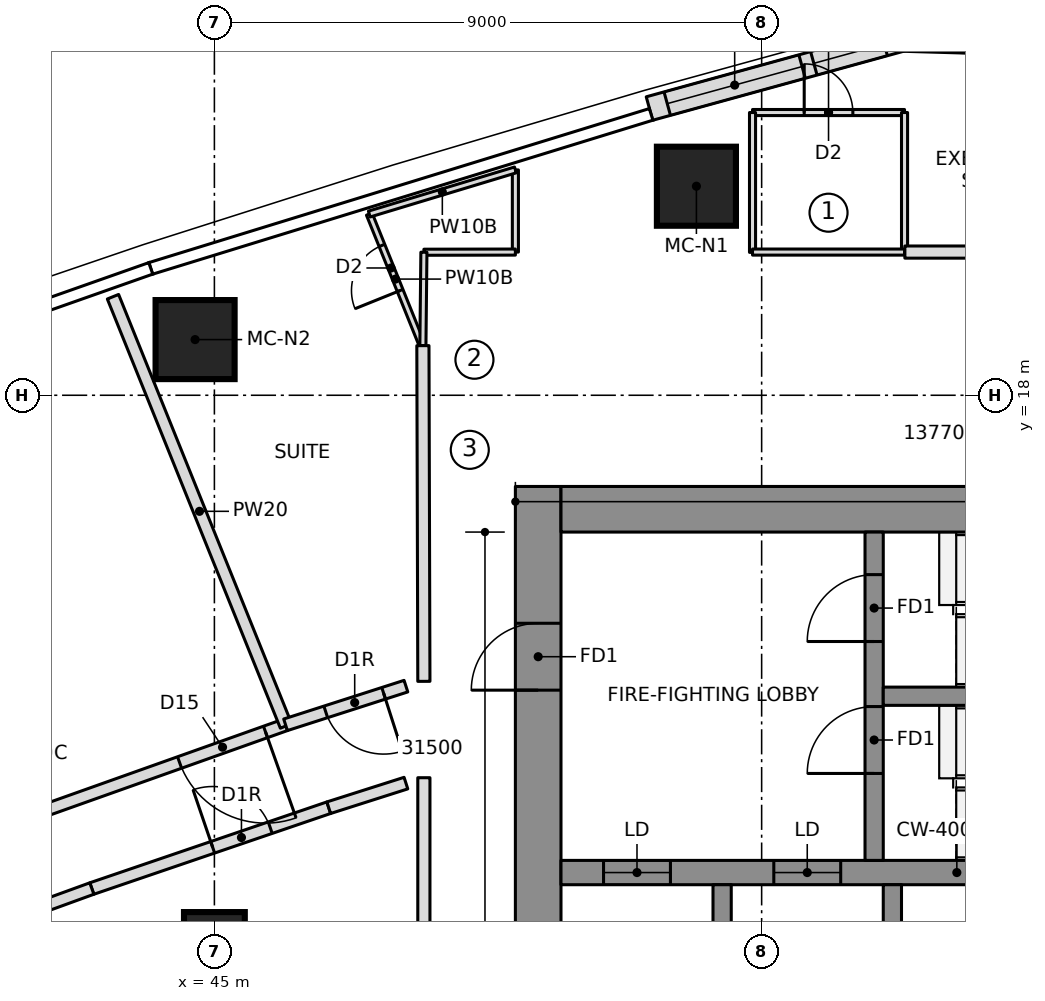
"""IFC4 building model, lengths in metres.
Left out: names, types, materials, properties, quantities, classifications, styles, units other than length and angle.
Written with IfcOpenShell. Run it as: python <this file> out.ifc"""

import sys

from ifc_helpers import new_model, si_unit, direction, frame, frame_2d, origin, origin_2d, place, context, subcontext, project, spatial, polyline, rectangle, outline, extrude, element, fill, save


model = new_model("IFC4")
c1 = context("Model", 3, precision=1e-05, world=origin(), true_north=direction((0.0, 1.0)))
c2 = subcontext(c1, "Body", "Model", "MODEL_VIEW")
j1 = project(units=[si_unit("LENGTHUNIT", "METRE"), si_unit("PLANEANGLEUNIT", "RADIAN")], contexts=[c1])
p1 = place(None, origin())
s1 = spatial("IfcSite", under=j1, at=p1, CompositionType="ELEMENT")
p2 = place(p1, origin())
s2 = spatial("IfcBuilding", under=s1, at=p2, CompositionType="ELEMENT")
p3 = place(p2, frame((0.0, 0.0, 196.8)))
s3 = spatial("IfcBuildingStorey", under=s2, at=p3, CompositionType="ELEMENT", Elevation=196.8)
p4 = place(p3, frame((50.325, 6.65, 0.0), z_axis=(0.0, 0.0, 1.0), x_axis=(0.0, 1.0, 0.0)))
e1 = element("IfcWall", 1, at=p4, inside=s3, PredefinedType="SHEAR", context=c2, shape_type="SweptSolid", body=[
    extrude(rectangle(XDim=9.85, YDim=0.75, at=frame_2d((4.925, 0.0))), origin(), (0.0, 0.0, 1.0), 3.55),
])
p5 = place(p4, frame((6.5, 0.0, 0.0)))
e2 = element("IfcOpeningElement", 2, at=p5, cuts=e1, PredefinedType="OPENING", context=c2, shape_type="SweptSolid", body=[
    extrude(rectangle(XDim=1.1, YDim=2.1, at=frame_2d((0.55, 1.05))), frame((0.0, 0.385, 0.0), z_axis=(0.0, -1.0, 0.0), x_axis=(1.0, 0.0, 0.0)), (0.0, 0.0, 1.0), 0.77),
])
p6 = place(p3, frame((50.7, 16.125, 0.0), z_axis=(0.0, 0.0, 1.0), x_axis=(1.0, 0.0, 0.0)))
e3 = element("IfcWall", 3, at=p6, inside=s3, PredefinedType="SHEAR", context=c2, shape_type="SweptSolid", body=[
    extrude(rectangle(XDim=13.77, YDim=0.75, at=frame_2d((6.885, 0.0))), origin(), (0.0, 0.0, 1.0), 3.55),
])
p7 = place(p3, frame((50.7, 10.15, 0.0), z_axis=(0.0, 0.0, 1.0), x_axis=(1.0, 0.0, 0.0)))
e4 = element("IfcWall", 4, at=p7, inside=s3, PredefinedType="SHEAR", context=c2, shape_type="SweptSolid", body=[
    extrude(rectangle(XDim=13.02, YDim=0.4, at=frame_2d((6.51, 0.0))), origin(), (0.0, 0.0, 1.0), 3.55),
])
p8 = place(p7, frame((0.7, 0.0, 0.0)))
e5 = element("IfcOpeningElement", 5, at=p8, cuts=e4, PredefinedType="OPENING", context=c2, shape_type="SweptSolid", body=[
    extrude(rectangle(XDim=1.1, YDim=2.1, at=frame_2d((0.55, 1.05))), frame((0.0, 0.21, 0.0), z_axis=(0.0, -1.0, 0.0), x_axis=(1.0, 0.0, 0.0)), (0.0, 0.0, 1.0), 0.42),
])
p9 = place(p7, frame((3.5, 0.0, 0.0)))
e6 = element("IfcOpeningElement", 6, at=p9, cuts=e4, PredefinedType="OPENING", context=c2, shape_type="SweptSolid", body=[
    extrude(rectangle(XDim=1.1, YDim=2.1, at=frame_2d((0.55, 1.05))), frame((0.0, 0.21, 0.0), z_axis=(0.0, -1.0, 0.0), x_axis=(1.0, 0.0, 0.0)), (0.0, 0.0, 1.0), 0.42),
])
for number, where, z_axis, x_axis in (
    (7, (53.35, 6.95, 0.0), (0.0, 0.0, 1.0), (0.0, 1.0, 0.0)),
    (8, (56.15, 6.95, 0.0), (0.0, 0.0, 1.0), (0.0, 1.0, 0.0)),
):
    element("IfcWall", number, at=place(p3, frame(where, z_axis=z_axis, x_axis=x_axis)), inside=s3, PredefinedType="SHEAR", context=c2, shape_type="SweptSolid", body=[
        extrude(rectangle(XDim=3.0, YDim=0.3, at=frame_2d((1.5, 0.0))), origin(), (0.0, 0.0, 1.0), 3.55),
    ])
p10 = place(p3, frame((55.85, 10.35, 0.0), z_axis=(0.0, 0.0, 1.0), x_axis=(0.0, 1.0, 0.0)))
e9 = element("IfcWall", 9, at=p10, inside=s3, PredefinedType="SHEAR", context=c2, shape_type="SweptSolid", body=[
    extrude(rectangle(XDim=5.4, YDim=0.3, at=frame_2d((2.7, 0.0))), origin(), (0.0, 0.0, 1.0), 3.55),
])
p11 = place(p10, frame((1.43, 0.0, 0.0)))
e10 = element("IfcOpeningElement", 10, at=p11, cuts=e9, PredefinedType="OPENING", context=c2, shape_type="SweptSolid", body=[
    extrude(rectangle(XDim=1.1, YDim=2.1, at=frame_2d((0.55, 1.05))), frame((0.0, 0.16, 0.0), z_axis=(0.0, -1.0, 0.0), x_axis=(1.0, 0.0, 0.0)), (0.0, 0.0, 1.0), 0.32),
])
p12 = place(p10, frame((3.6, 0.0, 0.0)))
e11 = element("IfcOpeningElement", 11, at=p12, cuts=e9, PredefinedType="OPENING", context=c2, shape_type="SweptSolid", body=[
    extrude(rectangle(XDim=1.1, YDim=2.1, at=frame_2d((0.55, 1.05))), frame((0.0, 0.16, 0.0), z_axis=(0.0, -1.0, 0.0), x_axis=(1.0, 0.0, 0.0)), (0.0, 0.0, 1.0), 0.32),
])
p13 = place(p3, frame((56.0, 13.05, 0.0), z_axis=(0.0, 0.0, 1.0), x_axis=(1.0, 0.0, 0.0)))
e12 = element("IfcWall", 12, at=p13, inside=s3, PredefinedType="SHEAR", context=c2, shape_type="SweptSolid", body=[
    extrude(rectangle(XDim=7.72, YDim=0.3, at=frame_2d((3.86, 0.0))), origin(), (0.0, 0.0, 1.0), 3.55),
])
for number, where, z_axis, x_axis in (
    (13, (52.927, 21.438, 0.0), (0.0, 0.0, 1.0), (1.0, 0.0, 0.0)),
    (14, (44.683, 18.916, 0.0), (0.0, 0.0, 1.0), (1.0, 0.0, 0.0)),
):
    element("IfcColumn", number, at=place(p3, frame(where, z_axis=z_axis, x_axis=x_axis)), inside=s3, PredefinedType="COLUMN", context=c2, shape_type="SweptSolid", body=[
        extrude(rectangle(XDim=1.3, YDim=1.3, at=origin_2d()), origin(), (0.0, 0.0, 1.0), 3.55),
    ])
p14 = place(p3, frame((45.0, 9.0, 0.0), z_axis=(0.0, 0.0, 1.0), x_axis=(1.0, 0.0, 0.0)))
e15 = element("IfcColumn", 15, at=p14, inside=s3, PredefinedType="COLUMN", context=c2, shape_type="SweptSolid", body=[
    extrude(rectangle(XDim=1.0, YDim=1.0, at=origin_2d()), origin(), (0.0, 0.0, 1.0), 3.55),
])
p15 = place(p3, frame((60.236, 23.745, 0.0), z_axis=(0.0, 0.0, 1.0), x_axis=(-0.999587920197, 0.028705222472, 0.0)))
e16 = element("IfcWall", 16, at=p15, inside=s3, PredefinedType="NOTDEFINED", context=c2, shape_type="SweptSolid", body=[
    extrude(outline(polyline([(-0.059, -0.2), (3.959, -0.2), (3.9, 0.2), (0.059, 0.2), (-0.059, -0.2)])), origin(), (0.0, 0.0, 1.0), 3.25),
])
p16 = place(p15, frame((0.865, 0.0, 0.6)))
e17 = element("IfcOpeningElement", 17, at=p16, cuts=e16, PredefinedType="OPENING", context=c2, shape_type="SweptSolid", body=[
    extrude(outline(polyline([(0.0, 1.35), (0.084, 1.771), (0.322, 2.128), (0.679, 2.366), (1.1, 2.45), (1.521, 2.366), (1.878, 2.128), (2.116, 1.771), (2.2, 1.35), (2.2, 1.1), (2.116, 0.679), (1.878, 0.322), (1.521, 0.084), (1.1, 0.0), (0.679, 0.084), (0.322, 0.322), (0.084, 0.679), (0.0, 1.1), (0.0, 1.35)])), frame((0.0, 0.21, 0.0), z_axis=(0.0, -1.0, 0.0), x_axis=(1.0, 0.0, 0.0)), (0.0, 0.0, 1.0), 0.42),
])
p17 = place(p3, frame((56.308, 23.858, 0.0), z_axis=(0.0, 0.0, 1.0), x_axis=(-0.964205755089, -0.265155165617, 0.0)))
e18 = element("IfcWall", 18, at=p17, inside=s3, PredefinedType="NOTDEFINED", context=c2, shape_type="SweptSolid", body=[
    extrude(outline(polyline([(-0.03, -0.2), (4.307, -0.2), (4.307, 0.2), (0.03, 0.2), (-0.03, -0.2)])), origin(), (0.0, 0.0, 1.0), 3.25),
])
p18 = place(p17, frame((0.303, 0.0, 0.9)))
e19 = element("IfcOpeningElement", 19, at=p18, cuts=e18, PredefinedType="OPENING", context=c2, shape_type="SweptSolid", body=[
    extrude(rectangle(XDim=1.2, YDim=1.8, at=frame_2d((0.6, 0.9))), frame((0.0, 0.21, 0.0), z_axis=(0.0, -1.0, 0.0), x_axis=(1.0, 0.0, 0.0)), (0.0, 0.0, 1.0), 0.42),
])
p19 = place(p17, frame((1.704, 0.0, 0.9)))
e20 = element("IfcOpeningElement", 20, at=p19, cuts=e18, PredefinedType="OPENING", context=c2, shape_type="SweptSolid", body=[
    extrude(rectangle(XDim=2.3, YDim=1.8, at=frame_2d((1.15, 0.9))), frame((0.0, 0.21, 0.0), z_axis=(0.0, -1.0, 0.0), x_axis=(1.0, 0.0, 0.0)), (0.0, 0.0, 1.0), 0.42),
])
p20 = place(p3, frame((53.85, 22.65, 0.0), z_axis=(0.0, 0.0, 1.0), x_axis=(1.0, 0.0, 0.0)))
e21 = element("IfcWall", 21, at=p20, inside=s3, PredefinedType="PARTITIONING", context=c2, shape_type="SweptSolid", body=[
    extrude(rectangle(XDim=2.5, YDim=0.1, at=frame_2d((1.25, 0.0))), origin(), (0.0, 0.0, 1.0), 3.25),
])
p21 = place(p20, frame((0.85, 0.0, 0.0)))
e22 = element("IfcOpeningElement", 22, at=p21, cuts=e21, PredefinedType="OPENING", context=c2, shape_type="SweptSolid", body=[
    extrude(rectangle(XDim=0.8, YDim=2.1, at=frame_2d((0.4, 1.05))), frame((0.0, 0.06, 0.0), z_axis=(0.0, -1.0, 0.0), x_axis=(1.0, 0.0, 0.0)), (0.0, 0.0, 1.0), 0.12),
])
for number, where, z_axis, x_axis in (
    (23, (56.35, 22.65, 0.0), (0.0, 0.0, 1.0), (0.0, -1.0, 0.0)),
    (24, (53.85, 20.35, 0.0), (0.0, 0.0, 1.0), (0.0, 1.0, 0.0)),
):
    element("IfcWall", number, at=place(p3, frame(where, z_axis=z_axis, x_axis=x_axis)), inside=s3, PredefinedType="PARTITIONING", context=c2, shape_type="SweptSolid", body=[
        extrude(rectangle(XDim=2.3, YDim=0.1, at=frame_2d((1.15, 0.0))), origin(), (0.0, 0.0, 1.0), 3.25),
    ])
p22 = place(p3, frame((46.17, 12.58, 0.0), z_axis=(0.0, 0.0, 1.0), x_axis=(-0.942170738702, -0.335133255786, 0.0)))
e25 = element("IfcWall", 25, at=p22, inside=s3, PredefinedType="PARTITIONING", context=c2, shape_type="SweptSolid", body=[
    extrude(rectangle(XDim=8.807, YDim=0.2, at=frame_2d((4.404, 0.0))), origin(), (0.0, 0.0, 1.0), 3.25),
])
p23 = place(p22, frame((0.35, 0.0, 0.0)))
e26 = element("IfcOpeningElement", 26, at=p23, cuts=e25, PredefinedType="OPENING", context=c2, shape_type="SweptSolid", body=[
    extrude(rectangle(XDim=1.5, YDim=2.1, at=frame_2d((0.75, 1.05))), frame((0.0, 0.11, 0.0), z_axis=(0.0, -1.0, 0.0), x_axis=(1.0, 0.0, 0.0)), (0.0, 0.0, 1.0), 0.22),
])
p24 = place(p3, frame((46.178, 12.562, 0.0), z_axis=(0.0, 0.0, 1.0), x_axis=(-0.373905590149, 0.927466770108, 0.0)))
e27 = element("IfcWall", 27, at=p24, inside=s3, PredefinedType="PARTITIONING", context=c2, shape_type="SweptSolid", body=[
    extrude(rectangle(XDim=7.611, YDim=0.2, at=frame_2d((3.806, 0.0))), origin(), (0.0, 0.0, 1.0), 3.25),
])
p25 = place(p3, frame((48.409, 18.841, 0.0), z_axis=(0.0, 0.0, 1.0), x_axis=(-0.373908119057, 0.927465750582, 0.0)))
e28 = element("IfcWall", 28, at=p25, inside=s3, PredefinedType="PARTITIONING", context=c2, shape_type="SweptSolid", body=[
    extrude(rectangle(XDim=2.306, YDim=0.1, at=frame_2d((1.153, 0.0))), origin(), (0.0, 0.0, 1.0), 3.25),
])
p26 = place(p25, frame((0.95, 0.0, 0.0)))
e29 = element("IfcOpeningElement", 29, at=p26, cuts=e28, PredefinedType="OPENING", context=c2, shape_type="SweptSolid", body=[
    extrude(rectangle(XDim=0.8, YDim=2.1, at=frame_2d((0.4, 1.05))), frame((0.0, 0.06, 0.0), z_axis=(0.0, -1.0, 0.0), x_axis=(1.0, 0.0, 0.0)), (0.0, 0.0, 1.0), 0.12),
])
p27 = place(p3, frame((42.984, 9.887, 0.0), z_axis=(0.0, 0.0, 1.0), x_axis=(0.946436071896, 0.322891253852, 0.0)))
e30 = element("IfcWall", 30, at=p27, inside=s3, PredefinedType="PARTITIONING", context=c2, shape_type="SweptSolid", body=[
    extrude(rectangle(XDim=4.117, YDim=0.2, at=frame_2d((2.059, 0.0))), origin(), (0.0, 0.0, 1.0), 3.25),
])
p28 = place(p27, frame((2.1, 0.0, 0.0)))
e31 = element("IfcOpeningElement", 31, at=p28, cuts=e30, PredefinedType="OPENING", context=c2, shape_type="SweptSolid", body=[
    extrude(rectangle(XDim=1.0, YDim=2.1, at=frame_2d((0.5, 1.05))), frame((0.0, 0.11, 0.0), z_axis=(0.0, -1.0, 0.0), x_axis=(1.0, 0.0, 0.0)), (0.0, 0.0, 1.0), 0.22),
])
p29 = place(p3, frame((40.19, 8.871, 0.0), z_axis=(0.0, 0.0, 1.0), x_axis=(0.939726274687, 0.341927665833, 0.0)))
e32 = element("IfcWall", 32, at=p29, inside=s3, PredefinedType="PARTITIONING", context=c2, shape_type="SweptSolid", body=[
    extrude(rectangle(XDim=2.973, YDim=0.2, at=frame_2d((1.487, 0.0))), origin(), (0.0, 0.0, 1.0), 3.25),
])
p30 = place(p3, frame((63.709, 20.355, 0.0), z_axis=(0.0, 0.0, 1.0), x_axis=(-1.0, 0.0, 0.0)))
e33 = element("IfcWall", 33, at=p30, inside=s3, PredefinedType="PARTITIONING", context=c2, shape_type="SweptSolid", body=[
    extrude(rectangle(XDim=7.354, YDim=0.2, at=frame_2d((3.677, 0.0))), origin(), (0.0, 0.0, 1.0), 3.25),
])
p31 = place(p30, frame((3.231, 0.0, 0.0)))
e34 = element("IfcOpeningElement", 34, at=p31, cuts=e33, PredefinedType="OPENING", context=c2, shape_type="SweptSolid", body=[
    extrude(rectangle(XDim=1.5, YDim=2.1, at=frame_2d((0.75, 1.05))), frame((0.0, 0.11, 0.0), z_axis=(0.0, -1.0, 0.0), x_axis=(1.0, 0.0, 0.0)), (0.0, 0.0, 1.0), 0.22),
])
p32 = place(p3, frame((56.35, 20.355, 0.0), z_axis=(0.0, 0.0, 1.0), x_axis=(-1.0, 0.0, 0.0)))
e35 = element("IfcWall", 35, at=p32, inside=s3, PredefinedType="PARTITIONING", context=c2, shape_type="SweptSolid", body=[
    extrude(rectangle(XDim=2.5, YDim=0.1, at=frame_2d((1.25, 0.0))), origin(), (0.0, 0.0, 1.0), 3.25),
])
p33 = place(p3, frame((49.95, 21.706, 0.0), z_axis=(0.0, 0.0, 1.0), x_axis=(0.0, -1.0, 0.0)))
e36 = element("IfcWall", 36, at=p33, inside=s3, PredefinedType="PARTITIONING", context=c2, shape_type="SweptSolid", body=[
    extrude(rectangle(XDim=1.351, YDim=0.1, at=frame_2d((0.676, 0.0))), origin(), (0.0, 0.0, 1.0), 3.25),
])
p34 = place(p3, frame((49.95, 20.355, 0.0), z_axis=(0.0, 0.0, 1.0), x_axis=(-0.999998406651, -0.001785131852, 0.0)))
e37 = element("IfcWall", 37, at=p34, inside=s3, PredefinedType="PARTITIONING", context=c2, shape_type="SweptSolid", body=[
    extrude(rectangle(XDim=1.504, YDim=0.1, at=frame_2d((0.752, 0.0))), origin(), (0.0, 0.0, 1.0), 3.25),
])
p35 = place(p3, frame((48.446, 20.352, 0.0), z_axis=(0.0, 0.0, 1.0), x_axis=(-0.010805026288, -0.999941624, 0.0)))
e38 = element("IfcWall", 38, at=p35, inside=s3, PredefinedType="PARTITIONING", context=c2, shape_type="SweptSolid", body=[
    extrude(rectangle(XDim=1.536, YDim=0.1, at=frame_2d((0.768, 0.0))), origin(), (0.0, 0.0, 1.0), 3.25),
])
p36 = place(p3, frame((47.547, 20.98, 0.0), z_axis=(0.0, 0.0, 1.0), x_axis=(0.957251518155, 0.289256859885, 0.0)))
e39 = element("IfcWall", 39, at=p36, inside=s3, PredefinedType="PARTITIONING", context=c2, shape_type="SweptSolid", body=[
    extrude(rectangle(XDim=2.51, YDim=0.1, at=frame_2d((1.255, 0.0))), origin(), (0.0, 0.0, 1.0), 3.25),
])
p37 = place(p3, frame((48.15, 13.216, 0.0), z_axis=(0.0, 0.0, 1.0), x_axis=(-0.952101841283, -0.305781104428, 0.0)))
e40 = element("IfcWall", 40, at=p37, inside=s3, PredefinedType="PARTITIONING", context=c2, shape_type="SweptSolid", body=[
    extrude(rectangle(XDim=2.079, YDim=0.2, at=frame_2d((1.04, 0.0))), origin(), (0.0, 0.0, 1.0), 3.25),
])
p38 = place(p37, frame((0.385, 0.0, 0.0)))
e41 = element("IfcOpeningElement", 41, at=p38, cuts=e40, PredefinedType="OPENING", context=c2, shape_type="SweptSolid", body=[
    extrude(rectangle(XDim=1.0, YDim=2.1, at=frame_2d((0.5, 1.05))), frame((0.0, 0.11, 0.0), z_axis=(0.0, -1.0, 0.0), x_axis=(1.0, 0.0, 0.0)), (0.0, 0.0, 1.0), 0.22),
])
p39 = place(p3, frame((46.881, 11.217, 0.0), z_axis=(0.0, 0.0, 1.0), x_axis=(0.952761948983, 0.303718074157, 0.0)))
e42 = element("IfcWall", 42, at=p39, inside=s3, PredefinedType="PARTITIONING", context=c2, shape_type="SweptSolid", body=[
    extrude(rectangle(XDim=1.332, YDim=0.2, at=frame_2d((0.666, 0.0))), origin(), (0.0, 0.0, 1.0), 3.25),
])
p40 = place(p3, frame((48.445, 11.71, 0.0), z_axis=(0.0, 0.0, 1.0), x_axis=(0.0, -1.0, 0.0)))
e43 = element("IfcWall", 43, at=p40, inside=s3, PredefinedType="PARTITIONING", context=c2, shape_type="SweptSolid", body=[
    extrude(rectangle(XDim=23.42, YDim=0.2, at=frame_2d((11.71, 0.0))), origin(), (0.0, 0.0, 1.0), 3.25),
])
p41 = place(p3, frame((48.429, 18.816, 0.0), z_axis=(0.0, 0.0, 1.0), x_axis=(0.002918533604, -0.999995741072, 0.0)))
e44 = element("IfcWall", 44, at=p41, inside=s3, PredefinedType="PARTITIONING", context=c2, shape_type="SweptSolid", body=[
    extrude(rectangle(XDim=5.521, YDim=0.2, at=frame_2d((2.76, 0.0))), origin(), (0.0, 0.0, 1.0), 3.25),
])
p42 = place(p16, origin())
e45 = element("IfcWindow", 45, at=p42, inside=s3, PartitioningType="SINGLE_PANEL", PredefinedType="WINDOW", context=c2, shape_type="SweptSolid", body=[
    extrude(outline(polyline([(0.0, 1.35), (0.084, 1.771), (0.322, 2.128), (0.679, 2.366), (1.1, 2.45), (1.521, 2.366), (1.878, 2.128), (2.116, 1.771), (2.2, 1.35), (2.2, 1.1), (2.116, 0.679), (1.878, 0.322), (1.521, 0.084), (1.1, 0.0), (0.679, 0.084), (0.322, 0.322), (0.084, 0.679), (0.0, 1.1), (0.0, 1.35)])), frame((0.0, 0.17, 0.0), z_axis=(0.0, -1.0, 0.0), x_axis=(1.0, 0.0, 0.0)), (0.0, 0.0, 1.0), 0.06),
])
fill(e17, e45)
p43 = place(p18, origin())
e46 = element("IfcWindow", 46, at=p43, inside=s3, PartitioningType="SINGLE_PANEL", PredefinedType="WINDOW", context=c2, shape_type="SweptSolid", body=[
    extrude(rectangle(XDim=1.2, YDim=1.8, at=frame_2d((0.6, 0.9))), frame((0.0, 0.17, 0.0), z_axis=(0.0, -1.0, 0.0), x_axis=(1.0, 0.0, 0.0)), (0.0, 0.0, 1.0), 0.06),
])
fill(e19, e46)
p44 = place(p19, origin())
e47 = element("IfcWindow", 47, at=p44, inside=s3, PartitioningType="SINGLE_PANEL", PredefinedType="WINDOW", context=c2, shape_type="SweptSolid", body=[
    extrude(rectangle(XDim=2.3, YDim=1.8, at=frame_2d((1.15, 0.9))), frame((0.0, 0.17, 0.0), z_axis=(0.0, -1.0, 0.0), x_axis=(1.0, 0.0, 0.0)), (0.0, 0.0, 1.0), 0.06),
])
fill(e20, e47)
p45 = place(p21, origin())
e48 = element("IfcDoor", 48, at=p45, inside=s3, OperationType="SINGLE_SWING_LEFT", PredefinedType="DOOR", context=c2, shape_type="SweptSolid", body=[
    extrude(rectangle(XDim=0.8, YDim=2.1, at=frame_2d((0.4, 1.05))), frame((0.0, 0.025, 0.0), z_axis=(0.0, -1.0, 0.0), x_axis=(1.0, 0.0, 0.0)), (0.0, 0.0, 1.0), 0.05),
])
fill(e22, e48)
p46 = place(p23, origin())
e49 = element("IfcDoor", 49, at=p46, inside=s3, OperationType="DOUBLE_DOOR_SINGLE_SWING", PredefinedType="DOOR", context=c2, shape_type="SweptSolid", body=[
    extrude(rectangle(XDim=1.5, YDim=2.1, at=frame_2d((0.75, 1.05))), frame((0.0, 0.025, 0.0), z_axis=(0.0, -1.0, 0.0), x_axis=(1.0, 0.0, 0.0)), (0.0, 0.0, 1.0), 0.05),
])
fill(e26, e49)
p47 = place(p26, origin())
e50 = element("IfcDoor", 50, at=p47, inside=s3, OperationType="SINGLE_SWING_LEFT", PredefinedType="DOOR", context=c2, shape_type="SweptSolid", body=[
    extrude(rectangle(XDim=0.8, YDim=2.1, at=frame_2d((0.4, 1.05))), frame((0.0, 0.025, 0.0), z_axis=(0.0, -1.0, 0.0), x_axis=(1.0, 0.0, 0.0)), (0.0, 0.0, 1.0), 0.05),
])
fill(e29, e50)
p48 = place(p38, origin())
e51 = element("IfcDoor", 51, at=p48, inside=s3, OperationType="SINGLE_SWING_RIGHT", PredefinedType="DOOR", context=c2, shape_type="SweptSolid", body=[
    extrude(rectangle(XDim=1.0, YDim=2.1, at=frame_2d((0.5, 1.05))), frame((0.0, 0.025, 0.0), z_axis=(0.0, -1.0, 0.0), x_axis=(1.0, 0.0, 0.0)), (0.0, 0.0, 1.0), 0.05),
])
fill(e41, e51)
p49 = place(p28, origin())
e52 = element("IfcDoor", 52, at=p49, inside=s3, OperationType="SINGLE_SWING_RIGHT", PredefinedType="DOOR", context=c2, shape_type="SweptSolid", body=[
    extrude(rectangle(XDim=1.0, YDim=2.1, at=frame_2d((0.5, 1.05))), frame((0.0, 0.025, 0.0), z_axis=(0.0, -1.0, 0.0), x_axis=(1.0, 0.0, 0.0)), (0.0, 0.0, 1.0), 0.05),
])
fill(e31, e52)
p50 = place(p8, origin())
e53 = element("IfcDoor", 53, at=p50, inside=s3, OperationType="DOUBLE_DOOR_SLIDING", PredefinedType="DOOR", context=c2, shape_type="SweptSolid", body=[
    extrude(rectangle(XDim=1.1, YDim=2.1, at=frame_2d((0.55, 1.05))), frame((0.0, 0.025, 0.0), z_axis=(0.0, -1.0, 0.0), x_axis=(1.0, 0.0, 0.0)), (0.0, 0.0, 1.0), 0.05),
])
fill(e5, e53)
p51 = place(p9, origin())
e54 = element("IfcDoor", 54, at=p51, inside=s3, OperationType="DOUBLE_DOOR_SLIDING", PredefinedType="DOOR", context=c2, shape_type="SweptSolid", body=[
    extrude(rectangle(XDim=1.1, YDim=2.1, at=frame_2d((0.55, 1.05))), frame((0.0, 0.025, 0.0), z_axis=(0.0, -1.0, 0.0), x_axis=(1.0, 0.0, 0.0)), (0.0, 0.0, 1.0), 0.05),
])
fill(e6, e54)
p52 = place(p11, origin())
e55 = element("IfcDoor", 55, at=p52, inside=s3, OperationType="SINGLE_SWING_RIGHT", PredefinedType="DOOR", context=c2, shape_type="SweptSolid", body=[
    extrude(rectangle(XDim=1.1, YDim=2.1, at=frame_2d((0.55, 1.05))), frame((0.0, 0.025, 0.0), z_axis=(0.0, -1.0, 0.0), x_axis=(1.0, 0.0, 0.0)), (0.0, 0.0, 1.0), 0.05),
])
fill(e10, e55)
p53 = place(p12, origin())
e56 = element("IfcDoor", 56, at=p53, inside=s3, OperationType="SINGLE_SWING_RIGHT", PredefinedType="DOOR", context=c2, shape_type="SweptSolid", body=[
    extrude(rectangle(XDim=1.1, YDim=2.1, at=frame_2d((0.55, 1.05))), frame((0.0, 0.025, 0.0), z_axis=(0.0, -1.0, 0.0), x_axis=(1.0, 0.0, 0.0)), (0.0, 0.0, 1.0), 0.05),
])
fill(e11, e56)
p54 = place(p5, origin())
e57 = element("IfcDoor", 57, at=p54, inside=s3, OperationType="SINGLE_SWING_RIGHT", PredefinedType="DOOR", context=c2, shape_type="SweptSolid", body=[
    extrude(rectangle(XDim=1.1, YDim=2.1, at=frame_2d((0.55, 1.05))), frame((0.0, 0.025, 0.0), z_axis=(0.0, -1.0, 0.0), x_axis=(1.0, 0.0, 0.0)), (0.0, 0.0, 1.0), 0.05),
])
fill(e2, e57)
save(model, sys.argv[1])
